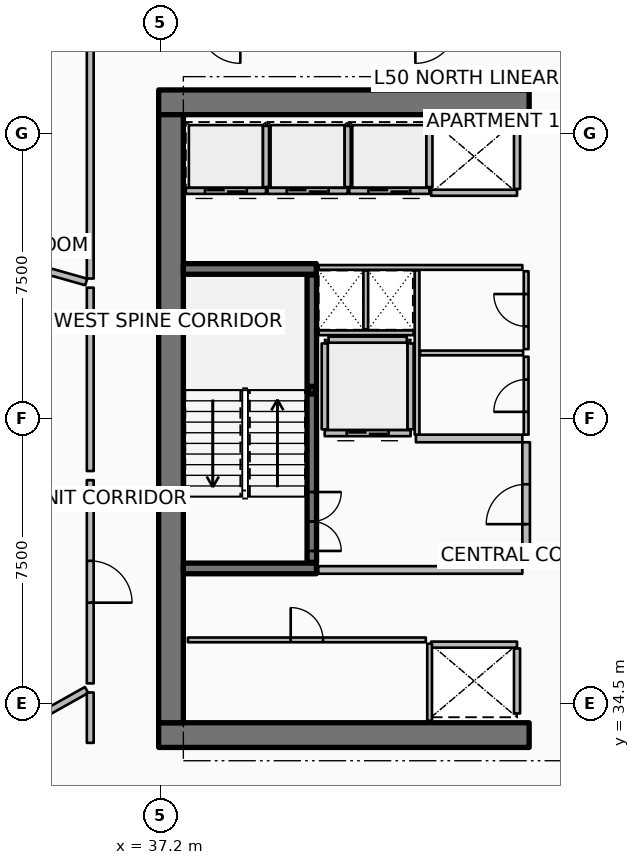
"""IFC4 building model, lengths in metres.
Left out: names, types, materials, properties, quantities, classifications, styles, units other than length and angle.
Written with IfcOpenShell. Run it as: python <this file> out.ifc"""

import sys

from ifc_helpers import new_model, si_unit, direction, frame, frame_2d, origin, origin_2d, place, context, subcontext, project, spatial, rectangle, hollow_rectangle, extrude, element, fill, save


model = new_model("IFC4")
c1 = context("Model", 3, precision=1e-05, world=origin(), true_north=direction((0.0, 1.0)))
c2 = subcontext(c1, "Body", "Model", "MODEL_VIEW")
j1 = project(units=[si_unit("LENGTHUNIT", "METRE"), si_unit("PLANEANGLEUNIT", "RADIAN")], contexts=[c1])
p1 = place(None, origin())
s1 = spatial("IfcSite", under=j1, at=p1, CompositionType="ELEMENT")
p2 = place(p1, origin())
s2 = spatial("IfcBuilding", under=s1, at=p2, CompositionType="ELEMENT")
p3 = place(p2, frame((0.0, 0.0, 199.05)))
s3 = spatial("IfcBuildingStorey", under=s2, at=p3, CompositionType="ELEMENT", Elevation=199.05)
for number, where, z_axis, x_axis in (
    (1, (37.15, 33.675, 0.0), (0.0, 0.0, 1.0), (1.0, 0.0, 0.0)),
    (2, (37.15, 50.325, 0.0), (0.0, 0.0, 1.0), (1.0, 0.0, 0.0)),
):
    element("IfcWall", number, at=place(p3, frame(where, z_axis=z_axis, x_axis=x_axis)), inside=s3, PredefinedType="SHEAR", context=c2, shape_type="SweptSolid", body=[
        extrude(rectangle(XDim=9.75, YDim=0.65, at=frame_2d((4.875, 0.0))), origin(), (0.0, 0.0, 1.0), 3.75),
    ])
p4 = place(p3, frame((37.475, 34.0, 0.0), z_axis=(0.0, 0.0, 1.0), x_axis=(0.0, 1.0, 0.0)))
e3 = element("IfcWall", 3, at=p4, inside=s3, PredefinedType="SHEAR", context=c2, shape_type="SweptSolid", body=[
    extrude(rectangle(XDim=16.0, YDim=0.65, at=frame_2d((8.0, 0.0))), origin(), (0.0, 0.0, 1.0), 3.75),
])
for number, where, z_axis, x_axis in (
    (4, (37.8, 38.06, 0.0), (0.0, 0.0, 1.0), (1.0, 0.0, 0.0)),
    (5, (37.8, 45.94, 0.0), (0.0, 0.0, 1.0), (1.0, 0.0, 0.0)),
):
    element("IfcWall", number, at=place(p3, frame(where, z_axis=z_axis, x_axis=x_axis)), inside=s3, PredefinedType="SHEAR", context=c2, shape_type="SweptSolid", body=[
        extrude(rectangle(XDim=3.5, YDim=0.28, at=frame_2d((1.75, 0.0))), origin(), (0.0, 0.0, 1.0), 3.75),
    ])
p5 = place(p3, frame((41.18, 42.75, 0.0), z_axis=(0.0, 0.0, 1.0), x_axis=(1.0, 0.0, 0.0)))
e6 = element("IfcColumn", 6, at=p5, inside=s3, PredefinedType="COLUMN", context=c2, shape_type="SweptSolid", body=[
    extrude(hollow_rectangle(XDim=0.2, YDim=0.2, WallThickness=0.01, InnerFilletRadius=0.01, OuterFilletRadius=0.02, at=origin_2d()), origin(), (0.0, 0.0, 1.0), 1.67),
])
p6 = place(p3, frame((41.18, 38.22, 0.0), z_axis=(0.0, 0.0, 1.0), x_axis=(0.0, 1.0, 0.0)))
e7 = element("IfcWall", 7, at=p6, inside=s3, PredefinedType="SOLIDWALL", context=c2, shape_type="SweptSolid", body=[
    extrude(rectangle(XDim=7.56, YDim=0.25, at=frame_2d((3.78, 0.0))), origin(), (0.0, 0.0, 1.0), 3.5),
])
p7 = place(p6, frame((0.3, 0.0, 0.0)))
e8 = element("IfcOpeningElement", 8, at=p7, cuts=e7, PredefinedType="OPENING", context=c2, shape_type="SweptSolid", body=[
    extrude(rectangle(XDim=1.55, YDim=2.15, at=frame_2d((0.775, 1.075))), frame((0.0, 0.135, 0.0), z_axis=(0.0, -1.0, 0.0), x_axis=(1.0, 0.0, 0.0)), (0.0, 0.0, 1.0), 0.27),
])
p8 = place(p3, frame((39.975, 47.995, 0.0), z_axis=(0.0, 0.0, 1.0), x_axis=(-1.0, 0.0, 0.0)))
e9 = element("IfcWall", 9, at=p8, inside=s3, PredefinedType="PARTITIONING", context=c2, shape_type="SweptSolid", body=[
    extrude(rectangle(XDim=2.11, YDim=0.16, at=frame_2d((1.055, 0.0))), origin(), (0.0, 0.0, 1.0), 3.5),
])
p9 = place(p8, frame((0.505, 0.0, 0.0)))
e10 = element("IfcOpeningElement", 10, at=p9, cuts=e9, PredefinedType="OPENING", context=c2, shape_type="SweptSolid", body=[
    extrude(rectangle(XDim=1.1, YDim=2.1, at=frame_2d((0.55, 1.05))), frame((0.0, 0.09, 0.0), z_axis=(0.0, -1.0, 0.0), x_axis=(1.0, 0.0, 0.0)), (0.0, 0.0, 1.0), 0.18),
])
p10 = place(p3, frame((39.975, 48.095, 0.0), z_axis=(0.0, 0.0, 1.0), x_axis=(0.0, 1.0, 0.0)))
e11 = element("IfcWall", 11, at=p10, inside=s3, PredefinedType="PARTITIONING", context=c2, shape_type="SweptSolid", body=[
    extrude(rectangle(XDim=1.61, YDim=0.16, at=frame_2d((0.805, 0.0))), origin(), (0.0, 0.0, 1.0), 3.5),
])
p11 = place(p3, frame((42.125, 47.995, 0.0), z_axis=(0.0, 0.0, 1.0), x_axis=(-1.0, 0.0, 0.0)))
e12 = element("IfcWall", 12, at=p11, inside=s3, PredefinedType="PARTITIONING", context=c2, shape_type="SweptSolid", body=[
    extrude(rectangle(XDim=2.11, YDim=0.16, at=frame_2d((1.055, 0.0))), origin(), (0.0, 0.0, 1.0), 3.5),
])
p12 = place(p11, frame((0.505, 0.0, 0.0)))
e13 = element("IfcOpeningElement", 13, at=p12, cuts=e12, PredefinedType="OPENING", context=c2, shape_type="SweptSolid", body=[
    extrude(rectangle(XDim=1.1, YDim=2.1, at=frame_2d((0.55, 1.05))), frame((0.0, 0.09, 0.0), z_axis=(0.0, -1.0, 0.0), x_axis=(1.0, 0.0, 0.0)), (0.0, 0.0, 1.0), 0.18),
])
p13 = place(p3, frame((42.125, 48.095, 0.0), z_axis=(0.0, 0.0, 1.0), x_axis=(0.0, 1.0, 0.0)))
e14 = element("IfcWall", 14, at=p13, inside=s3, PredefinedType="PARTITIONING", context=c2, shape_type="SweptSolid", body=[
    extrude(rectangle(XDim=1.61, YDim=0.16, at=frame_2d((0.805, 0.0))), origin(), (0.0, 0.0, 1.0), 3.5),
])
p14 = place(p3, frame((44.275, 47.995, 0.0), z_axis=(0.0, 0.0, 1.0), x_axis=(-1.0, 0.0, 0.0)))
e15 = element("IfcWall", 15, at=p14, inside=s3, PredefinedType="PARTITIONING", context=c2, shape_type="SweptSolid", body=[
    extrude(rectangle(XDim=2.11, YDim=0.16, at=frame_2d((1.055, 0.0))), origin(), (0.0, 0.0, 1.0), 3.5),
])
p15 = place(p14, frame((0.505, 0.0, 0.0)))
e16 = element("IfcOpeningElement", 16, at=p15, cuts=e15, PredefinedType="OPENING", context=c2, shape_type="SweptSolid", body=[
    extrude(rectangle(XDim=1.1, YDim=2.1, at=frame_2d((0.55, 1.05))), frame((0.0, 0.09, 0.0), z_axis=(0.0, -1.0, 0.0), x_axis=(1.0, 0.0, 0.0)), (0.0, 0.0, 1.0), 0.18),
])
p16 = place(p3, frame((44.275, 48.095, 0.0), z_axis=(0.0, 0.0, 1.0), x_axis=(0.0, 1.0, 0.0)))
e17 = element("IfcWall", 17, at=p16, inside=s3, PredefinedType="PARTITIONING", context=c2, shape_type="SweptSolid", body=[
    extrude(rectangle(XDim=1.61, YDim=0.16, at=frame_2d((0.805, 0.0))), origin(), (0.0, 0.0, 1.0), 3.5),
])
p17 = place(p3, frame((46.58, 47.945, 0.0), z_axis=(0.0, 0.0, 1.0), x_axis=(-1.0, 0.0, 0.0)))
e18 = element("IfcWall", 18, at=p17, inside=s3, PredefinedType="PARTITIONING", context=c2, shape_type="SweptSolid", body=[
    extrude(rectangle(XDim=2.26, YDim=0.16, at=frame_2d((1.13, 0.0))), origin(), (0.0, 0.0, 1.0), 3.5),
])
p18 = place(p3, frame((46.58, 48.045, 0.0), z_axis=(0.0, 0.0, 1.0), x_axis=(0.0, 1.0, 0.0)))
e19 = element("IfcWall", 19, at=p18, inside=s3, PredefinedType="PARTITIONING", context=c2, shape_type="SweptSolid", body=[
    extrude(rectangle(XDim=1.71, YDim=0.16, at=frame_2d((0.855, 0.0))), origin(), (0.0, 0.0, 1.0), 3.5),
])
p19 = place(p3, frame((44.32, 36.055, 0.0), z_axis=(0.0, 0.0, 1.0), x_axis=(1.0, 0.0, 0.0)))
e20 = element("IfcWall", 20, at=p19, inside=s3, PredefinedType="PARTITIONING", context=c2, shape_type="SweptSolid", body=[
    extrude(rectangle(XDim=2.26, YDim=0.16, at=frame_2d((1.13, 0.0))), origin(), (0.0, 0.0, 1.0), 3.5),
])
p20 = place(p3, frame((46.58, 34.245, 0.0), z_axis=(0.0, 0.0, 1.0), x_axis=(0.0, 1.0, 0.0)))
e21 = element("IfcWall", 21, at=p20, inside=s3, PredefinedType="PARTITIONING", context=c2, shape_type="SweptSolid", body=[
    extrude(rectangle(XDim=1.71, YDim=0.16, at=frame_2d((0.855, 0.0))), origin(), (0.0, 0.0, 1.0), 3.5),
])
p21 = place(p3, frame((43.78, 41.62, 0.0), z_axis=(0.0, 0.0, 1.0), x_axis=(-1.0, 0.0, 0.0)))
e22 = element("IfcWall", 22, at=p21, inside=s3, PredefinedType="PARTITIONING", context=c2, shape_type="SweptSolid", body=[
    extrude(rectangle(XDim=2.26, YDim=0.16, at=frame_2d((1.13, 0.0))), origin(), (0.0, 0.0, 1.0), 3.5),
])
p22 = place(p21, frame((0.58, 0.0, 0.0)))
e23 = element("IfcOpeningElement", 23, at=p22, cuts=e22, PredefinedType="OPENING", context=c2, shape_type="SweptSolid", body=[
    extrude(rectangle(XDim=1.1, YDim=2.1, at=frame_2d((0.55, 1.05))), frame((0.0, 0.09, 0.0), z_axis=(0.0, -1.0, 0.0), x_axis=(1.0, 0.0, 0.0)), (0.0, 0.0, 1.0), 0.18),
])
for number, where, z_axis, x_axis in (
    (24, (43.78, 41.72, 0.0), (0.0, 0.0, 1.0), (0.0, 1.0, 0.0)),
    (25, (41.52, 41.72, 0.0), (0.0, 0.0, 1.0), (0.0, 1.0, 0.0)),
):
    element("IfcWall", number, at=place(p3, frame(where, z_axis=z_axis, x_axis=x_axis)), inside=s3, PredefinedType="PARTITIONING", context=c2, shape_type="SweptSolid", body=[
        extrude(rectangle(XDim=2.26, YDim=0.16, at=frame_2d((1.13, 0.0))), origin(), (0.0, 0.0, 1.0), 3.5),
    ])
p23 = place(p3, frame((41.62, 44.08, 0.0), z_axis=(0.0, 0.0, 1.0), x_axis=(1.0, 0.0, 0.0)))
e26 = element("IfcWall", 26, at=p23, inside=s3, PredefinedType="PARTITIONING", context=c2, shape_type="SweptSolid", body=[
    extrude(rectangle(XDim=2.06, YDim=0.16, at=frame_2d((1.03, 0.0))), origin(), (0.0, 0.0, 1.0), 3.5),
])
p24 = place(p3, frame((44.28, 34.05, 0.0), z_axis=(0.0, 0.0, 1.0), x_axis=(0.0, 1.0, 0.0)))
e27 = element("IfcWall", 27, at=p24, inside=s3, PredefinedType="PARTITIONING", context=c2, shape_type="SweptSolid", body=[
    extrude(rectangle(XDim=2.03, YDim=0.125, at=frame_2d((1.015, 0.0))), origin(), (0.0, 0.0, 1.0), 2.94),
])
p25 = place(p3, frame((37.92, 36.18, 0.0), z_axis=(0.0, 0.0, 1.0), x_axis=(1.0, 0.0, 0.0)))
e28 = element("IfcWall", 28, at=p25, inside=s3, PredefinedType="PARTITIONING", context=c2, shape_type="SweptSolid", body=[
    extrude(rectangle(XDim=6.26, YDim=0.125, at=frame_2d((3.13, 0.0))), origin(), (0.0, 0.0, 1.0), 2.94),
])
p26 = place(p25, frame((2.705, 0.0, 0.0)))
e29 = element("IfcOpeningElement", 29, at=p26, cuts=e28, PredefinedType="OPENING", context=c2, shape_type="SweptSolid", body=[
    extrude(rectangle(XDim=0.85, YDim=2.06, at=frame_2d((0.425, 1.03))), frame((0.0, 0.073, 0.0), z_axis=(0.0, -1.0, 0.0), x_axis=(1.0, 0.0, 0.0)), (0.0, 0.0, 1.0), 0.145),
])
p27 = place(p3, frame((41.35, 38.02, 0.0), z_axis=(0.0, 0.0, 1.0), x_axis=(1.0, 0.0, 0.0)))
e30 = element("IfcWall", 30, at=p27, inside=s3, PredefinedType="PARTITIONING", context=c2, shape_type="SweptSolid", body=[
    extrude(rectangle(XDim=5.37, YDim=0.2, at=frame_2d((2.685, 0.0))), origin(), (0.0, 0.0, 1.0), 3.5),
])
p28 = place(p3, frame((43.92, 41.48, 0.0), z_axis=(0.0, 0.0, 1.0), x_axis=(1.0, 0.0, 0.0)))
e31 = element("IfcWall", 31, at=p28, inside=s3, PredefinedType="PARTITIONING", context=c2, shape_type="SweptSolid", body=[
    extrude(rectangle(XDim=2.8, YDim=0.2, at=frame_2d((1.4, 0.0))), origin(), (0.0, 0.0, 1.0), 3.5),
])
p29 = place(p3, frame((46.82, 38.12, 0.0), z_axis=(0.0, 0.0, 1.0), x_axis=(0.0, 1.0, 0.0)))
e32 = element("IfcWall", 32, at=p29, inside=s3, PredefinedType="PARTITIONING", context=c2, shape_type="SweptSolid", body=[
    extrude(rectangle(XDim=3.26, YDim=0.2, at=frame_2d((1.63, 0.0))), origin(), (0.0, 0.0, 1.0), 3.5),
])
p30 = place(p29, frame((1.105, 0.0, 0.0)))
e33 = element("IfcOpeningElement", 33, at=p30, cuts=e32, PredefinedType="OPENING", context=c2, shape_type="SweptSolid", body=[
    extrude(rectangle(XDim=1.05, YDim=2.1, at=frame_2d((0.525, 1.05))), frame((0.0, 0.11, 0.0), z_axis=(0.0, -1.0, 0.0), x_axis=(1.0, 0.0, 0.0)), (0.0, 0.0, 1.0), 0.22),
])
p31 = place(p3, frame((41.36, 45.98, 0.0), z_axis=(0.0, 0.0, 1.0), x_axis=(1.0, 0.0, 0.0)))
e34 = element("IfcWall", 34, at=p31, inside=s3, PredefinedType="PARTITIONING", context=c2, shape_type="SweptSolid", body=[
    extrude(rectangle(XDim=5.36, YDim=0.125, at=frame_2d((2.68, 0.0))), origin(), (0.0, 0.0, 1.0), 2.94),
])
p32 = place(p3, frame((41.36, 44.26, 0.0), z_axis=(0.0, 0.0, 1.0), x_axis=(1.0, 0.0, 0.0)))
e35 = element("IfcWall", 35, at=p32, inside=s3, PredefinedType="PARTITIONING", context=c2, shape_type="SweptSolid", body=[
    extrude(rectangle(XDim=2.5, YDim=0.125, at=frame_2d((1.25, 0.0))), origin(), (0.0, 0.0, 1.0), 2.94),
])
p33 = place(p3, frame((42.6, 44.35, 0.0), z_axis=(0.0, 0.0, 1.0), x_axis=(0.0, 1.0, 0.0)))
e36 = element("IfcWall", 36, at=p33, inside=s3, PredefinedType="PARTITIONING", context=c2, shape_type="SweptSolid", body=[
    extrude(rectangle(XDim=1.55, YDim=0.125, at=frame_2d((0.775, 0.0))), origin(), (0.0, 0.0, 1.0), 2.94),
])
p34 = place(p3, frame((43.95, 41.58, 0.0), z_axis=(0.0, 0.0, 1.0), x_axis=(0.0, 1.0, 0.0)))
e37 = element("IfcWall", 37, at=p34, inside=s3, PredefinedType="PARTITIONING", context=c2, shape_type="SweptSolid", body=[
    extrude(rectangle(XDim=4.32, YDim=0.125, at=frame_2d((2.16, 0.0))), origin(), (0.0, 0.0, 1.0), 2.94),
])
p35 = place(p3, frame((44.03, 43.73, 0.0), z_axis=(0.0, 0.0, 1.0), x_axis=(1.0, 0.0, 0.0)))
e38 = element("IfcWall", 38, at=p35, inside=s3, PredefinedType="PARTITIONING", context=c2, shape_type="SweptSolid", body=[
    extrude(rectangle(XDim=2.71, YDim=0.125, at=frame_2d((1.355, 0.0))), origin(), (0.0, 0.0, 1.0), 2.94),
])
p36 = place(p3, frame((46.82, 41.58, 0.0), z_axis=(0.0, 0.0, 1.0), x_axis=(0.0, 1.0, 0.0)))
e39 = element("IfcWall", 39, at=p36, inside=s3, PredefinedType="PARTITIONING", context=c2, shape_type="SweptSolid", body=[
    extrude(rectangle(XDim=2.05, YDim=0.125, at=frame_2d((1.025, 0.0))), origin(), (0.0, 0.0, 1.0), 2.94),
])
p37 = place(p36, frame((0.6, 0.0, 0.0)))
e40 = element("IfcOpeningElement", 40, at=p37, cuts=e39, PredefinedType="OPENING", context=c2, shape_type="SweptSolid", body=[
    extrude(rectangle(XDim=0.85, YDim=2.06, at=frame_2d((0.425, 1.03))), frame((0.0, 0.073, 0.0), z_axis=(0.0, -1.0, 0.0), x_axis=(1.0, 0.0, 0.0)), (0.0, 0.0, 1.0), 0.145),
])
p38 = place(p3, frame((46.82, 43.83, 0.0), z_axis=(0.0, 0.0, 1.0), x_axis=(0.0, 1.0, 0.0)))
e41 = element("IfcWall", 41, at=p38, inside=s3, PredefinedType="PARTITIONING", context=c2, shape_type="SweptSolid", body=[
    extrude(rectangle(XDim=2.05, YDim=0.125, at=frame_2d((1.025, 0.0))), origin(), (0.0, 0.0, 1.0), 2.94),
])
p39 = place(p38, frame((0.6, 0.0, 0.0)))
e42 = element("IfcOpeningElement", 42, at=p39, cuts=e41, PredefinedType="OPENING", context=c2, shape_type="SweptSolid", body=[
    extrude(rectangle(XDim=0.85, YDim=2.06, at=frame_2d((0.425, 1.03))), frame((0.0, 0.073, 0.0), z_axis=(0.0, -1.0, 0.0), x_axis=(1.0, 0.0, 0.0)), (0.0, 0.0, 1.0), 0.145),
])
p40 = place(p3, frame((35.244, 45.598, 0.0), z_axis=(0.0, 0.0, 1.0), x_axis=(-0.962456561262, 0.271435752405, 0.0)))
e43 = element("IfcWall", 43, at=p40, inside=s3, PredefinedType="PARTITIONING", context=c2, shape_type="SweptSolid", body=[
    extrude(rectangle(XDim=13.777, YDim=0.18, at=frame_2d((6.888, 0.0))), origin(), (0.0, 0.0, 1.0), 2.94),
])
p41 = place(p3, frame((35.254, 34.862, 0.0), z_axis=(0.0, 0.0, 1.0), x_axis=(-0.872489721771, -0.488632464541, 0.0)))
e44 = element("IfcWall", 44, at=p41, inside=s3, PredefinedType="PARTITIONING", context=c2, shape_type="SweptSolid", body=[
    extrude(rectangle(XDim=13.286, YDim=0.18, at=frame_2d((6.643, 0.0))), origin(), (0.0, 0.0, 1.0), 2.94),
])
p42 = place(p3, frame((35.35, 51.853, 0.0), z_axis=(0.0, 0.0, 1.0), x_axis=(0.0, -1.0, 0.0)))
e45 = element("IfcWall", 45, at=p42, inside=s3, PredefinedType="PARTITIONING", context=c2, shape_type="SweptSolid", body=[
    extrude(rectangle(XDim=6.165, YDim=0.18, at=frame_2d((3.083, 0.0))), origin(), (0.0, 0.0, 1.0), 2.94),
])
p43 = place(p3, frame((35.35, 40.383, 0.0), z_axis=(0.0, 0.0, 1.0), x_axis=(0.0, -1.0, 0.0)))
e46 = element("IfcWall", 46, at=p43, inside=s3, PredefinedType="PARTITIONING", context=c2, shape_type="SweptSolid", body=[
    extrude(rectangle(XDim=5.347, YDim=0.18, at=frame_2d((2.674, 0.0))), origin(), (0.0, 0.0, 1.0), 2.94),
])
p44 = place(p43, frame((2.124, 0.0, 0.0)))
e47 = element("IfcOpeningElement", 47, at=p44, cuts=e46, PredefinedType="OPENING", context=c2, shape_type="SweptSolid", body=[
    extrude(rectangle(XDim=1.1, YDim=2.1, at=frame_2d((0.55, 1.05))), frame((0.0, 0.1, 0.0), z_axis=(0.0, -1.0, 0.0), x_axis=(1.0, 0.0, 0.0)), (0.0, 0.0, 1.0), 0.2),
])
p45 = place(p3, frame((35.35, 45.448, 0.0), z_axis=(0.0, 0.0, 1.0), x_axis=(0.0, -1.0, 0.0)))
e48 = element("IfcWall", 48, at=p45, inside=s3, PredefinedType="PARTITIONING", context=c2, shape_type="SweptSolid", body=[
    extrude(rectangle(XDim=4.825, YDim=0.18, at=frame_2d((2.413, 0.0))), origin(), (0.0, 0.0, 1.0), 2.94),
])
p46 = place(p3, frame((35.35, 34.796, 0.0), z_axis=(0.0, 0.0, 1.0), x_axis=(0.0, -1.0, 0.0)))
e49 = element("IfcWall", 49, at=p46, inside=s3, PredefinedType="PARTITIONING", context=c2, shape_type="SweptSolid", body=[
    extrude(rectangle(XDim=1.326, YDim=0.18, at=frame_2d((0.663, 0.0))), origin(), (0.0, 0.0, 1.0), 2.94),
])
p47 = place(p7, origin())
e50 = element("IfcDoor", 50, at=p47, inside=s3, OperationType="DOUBLE_DOOR_SINGLE_SWING", PredefinedType="DOOR", context=c2, shape_type="SweptSolid", body=[
    extrude(rectangle(XDim=1.55, YDim=2.15, at=frame_2d((0.775, 1.075))), frame((0.0, 0.025, 0.0), z_axis=(0.0, -1.0, 0.0), x_axis=(1.0, 0.0, 0.0)), (0.0, 0.0, 1.0), 0.05),
])
fill(e8, e50)
p48 = place(p9, origin())
e51 = element("IfcDoor", 51, at=p48, inside=s3, OperationType="DOUBLE_DOOR_SLIDING", PredefinedType="DOOR", context=c2, shape_type="SweptSolid", body=[
    extrude(rectangle(XDim=1.1, YDim=2.1, at=frame_2d((0.55, 1.05))), frame((0.0, 0.025, 0.0), z_axis=(0.0, -1.0, 0.0), x_axis=(1.0, 0.0, 0.0)), (0.0, 0.0, 1.0), 0.05),
])
fill(e10, e51)
p49 = place(p12, origin())
e52 = element("IfcDoor", 52, at=p49, inside=s3, OperationType="DOUBLE_DOOR_SLIDING", PredefinedType="DOOR", context=c2, shape_type="SweptSolid", body=[
    extrude(rectangle(XDim=1.1, YDim=2.1, at=frame_2d((0.55, 1.05))), frame((0.0, 0.025, 0.0), z_axis=(0.0, -1.0, 0.0), x_axis=(1.0, 0.0, 0.0)), (0.0, 0.0, 1.0), 0.05),
])
fill(e13, e52)
p50 = place(p15, origin())
e53 = element("IfcDoor", 53, at=p50, inside=s3, OperationType="DOUBLE_DOOR_SLIDING", PredefinedType="DOOR", context=c2, shape_type="SweptSolid", body=[
    extrude(rectangle(XDim=1.1, YDim=2.1, at=frame_2d((0.55, 1.05))), frame((0.0, 0.025, 0.0), z_axis=(0.0, -1.0, 0.0), x_axis=(1.0, 0.0, 0.0)), (0.0, 0.0, 1.0), 0.05),
])
fill(e16, e53)
p51 = place(p22, origin())
e54 = element("IfcDoor", 54, at=p51, inside=s3, OperationType="DOUBLE_DOOR_SLIDING", PredefinedType="DOOR", context=c2, shape_type="SweptSolid", body=[
    extrude(rectangle(XDim=1.1, YDim=2.1, at=frame_2d((0.55, 1.05))), frame((0.0, 0.025, 0.0), z_axis=(0.0, -1.0, 0.0), x_axis=(1.0, 0.0, 0.0)), (0.0, 0.0, 1.0), 0.05),
])
fill(e23, e54)
p52 = place(p26, origin())
e55 = element("IfcDoor", 55, at=p52, inside=s3, OperationType="SINGLE_SWING_LEFT", PredefinedType="DOOR", context=c2, shape_type="SweptSolid", body=[
    extrude(rectangle(XDim=0.85, YDim=2.06, at=frame_2d((0.425, 1.03))), frame((0.0, 0.025, 0.0), z_axis=(0.0, -1.0, 0.0), x_axis=(1.0, 0.0, 0.0)), (0.0, 0.0, 1.0), 0.05),
])
fill(e29, e55)
p53 = place(p30, origin())
e56 = element("IfcDoor", 56, at=p53, inside=s3, OperationType="SINGLE_SWING_LEFT", PredefinedType="DOOR", context=c2, shape_type="SweptSolid", body=[
    extrude(rectangle(XDim=1.05, YDim=2.1, at=frame_2d((0.525, 1.05))), frame((0.0, 0.025, 0.0), z_axis=(0.0, -1.0, 0.0), x_axis=(1.0, 0.0, 0.0)), (0.0, 0.0, 1.0), 0.05),
])
fill(e33, e56)
p54 = place(p37, origin())
e57 = element("IfcDoor", 57, at=p54, inside=s3, OperationType="SINGLE_SWING_LEFT", PredefinedType="DOOR", context=c2, shape_type="SweptSolid", body=[
    extrude(rectangle(XDim=0.85, YDim=2.06, at=frame_2d((0.425, 1.03))), frame((0.0, 0.025, 0.0), z_axis=(0.0, -1.0, 0.0), x_axis=(1.0, 0.0, 0.0)), (0.0, 0.0, 1.0), 0.05),
])
fill(e40, e57)
p55 = place(p39, origin())
e58 = element("IfcDoor", 58, at=p55, inside=s3, OperationType="SINGLE_SWING_RIGHT", PredefinedType="DOOR", context=c2, shape_type="SweptSolid", body=[
    extrude(rectangle(XDim=0.85, YDim=2.06, at=frame_2d((0.425, 1.03))), frame((0.0, 0.025, 0.0), z_axis=(0.0, -1.0, 0.0), x_axis=(1.0, 0.0, 0.0)), (0.0, 0.0, 1.0), 0.05),
])
fill(e42, e58)
p56 = place(p44, origin())
e59 = element("IfcDoor", 59, at=p56, inside=s3, OperationType="SINGLE_SWING_RIGHT", PredefinedType="DOOR", context=c2, shape_type="SweptSolid", body=[
    extrude(rectangle(XDim=1.1, YDim=2.1, at=frame_2d((0.55, 1.05))), frame((0.0, 0.025, 0.0), z_axis=(0.0, -1.0, 0.0), x_axis=(1.0, 0.0, 0.0)), (0.0, 0.0, 1.0), 0.05),
])
fill(e47, e59)
save(model, sys.argv[1])
